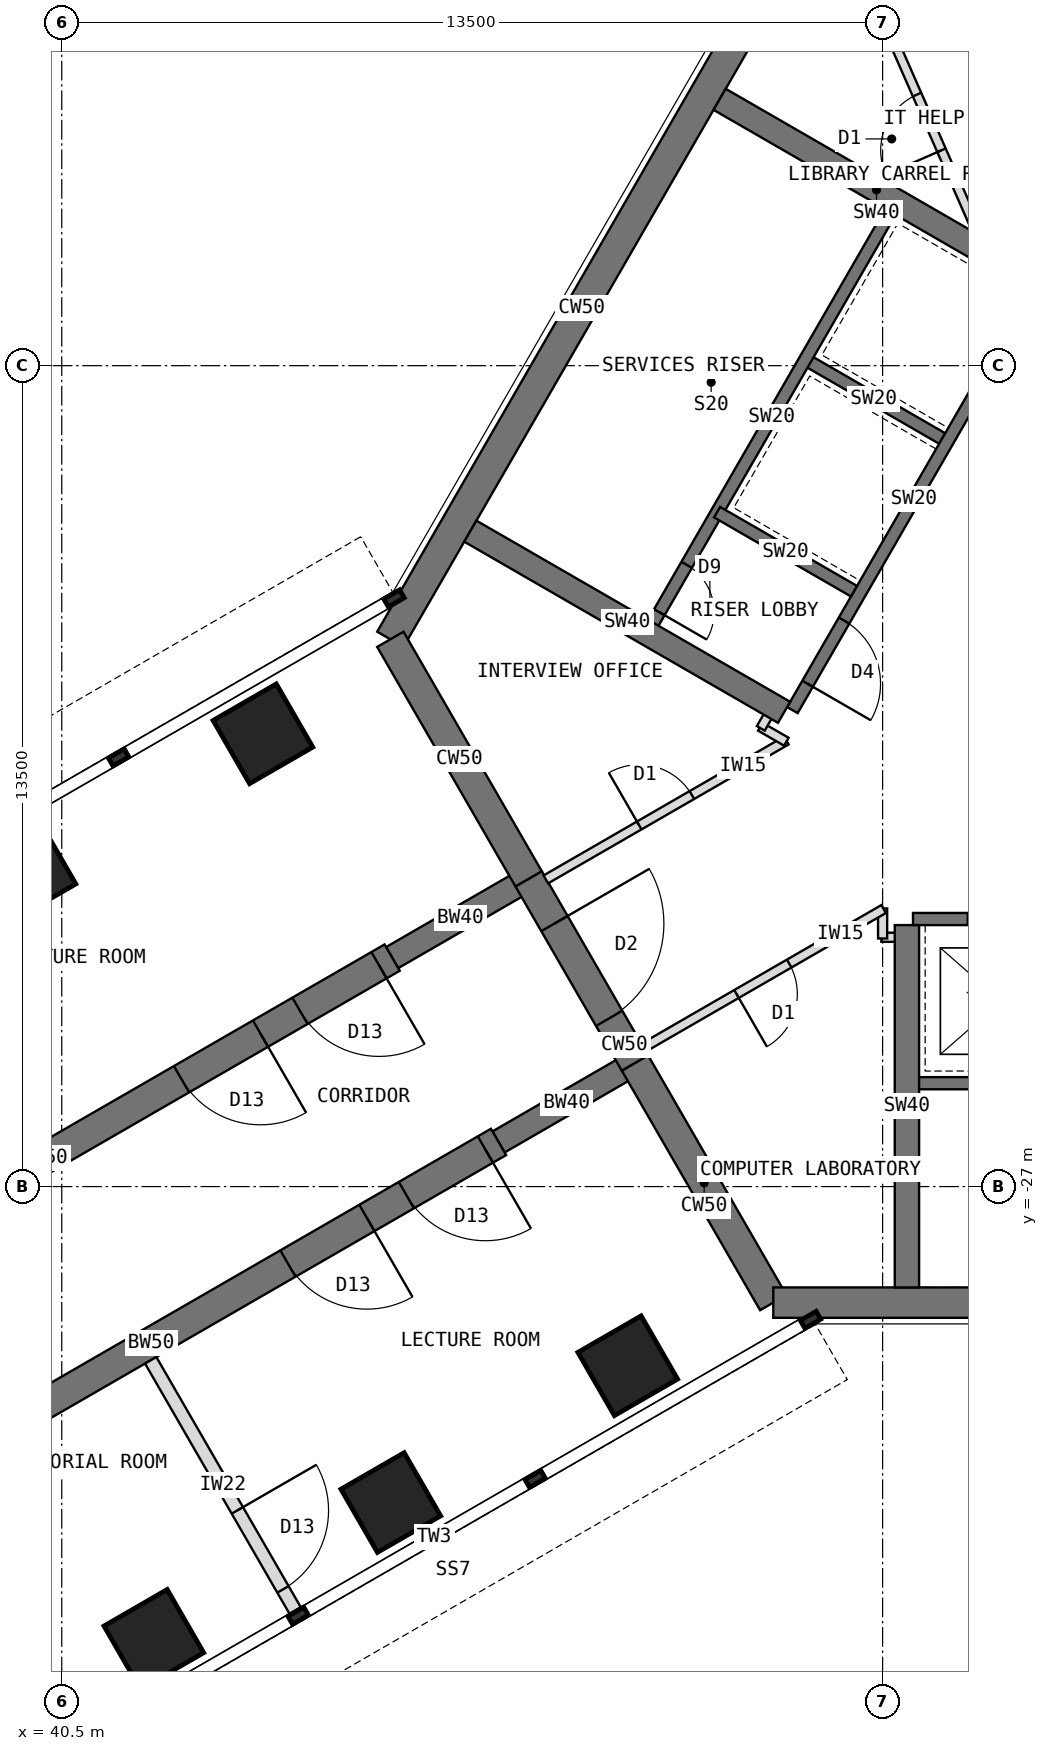
"""IFC4 building model, lengths in metres.
Left out: names, types, materials, properties, quantities, classifications, styles, units other than length and angle.
Written with IfcOpenShell. Run it as: python <this file> out.ifc"""

import sys

from ifc_helpers import new_model, si_unit, direction, frame, frame_2d, origin, origin_2d, place, context, subcontext, project, spatial, rectangle, extrude, element, fill, save


model = new_model("IFC4")
c1 = context("Model", 3, precision=1e-05, world=origin(), true_north=direction((0.0, 1.0)))
c2 = subcontext(c1, "Body", "Model", "MODEL_VIEW")
j1 = project(units=[si_unit("LENGTHUNIT", "METRE"), si_unit("PLANEANGLEUNIT", "RADIAN")], contexts=[c1])
p1 = place(None, origin())
s1 = spatial("IfcSite", under=j1, at=p1, CompositionType="ELEMENT")
p2 = place(p1, origin())
s2 = spatial("IfcBuilding", under=s1, at=p2, CompositionType="ELEMENT")
p3 = place(p2, frame((0.0, 0.0, 174.5)))
s3 = spatial("IfcBuildingStorey", under=s2, at=p3, CompositionType="ELEMENT", Elevation=174.5)
p4 = place(p3, frame((52.202, -7.092, 0.0), z_axis=(0.0, 0.0, 1.0), x_axis=(-0.500005998175, -0.866021940709, 0.0)))
e1 = element("IfcWall", 1, at=p4, inside=s3, PredefinedType="SHEAR", context=c2, shape_type="SweptSolid", body=[
    extrude(rectangle(XDim=12.596, YDim=0.5, at=frame_2d((6.298, 0.0))), origin(), (0.0, 0.0, 1.0), 4.0),
])
p5 = place(p3, frame((45.904, -18.0, 0.0), z_axis=(0.0, 0.0, 1.0), x_axis=(0.500024481964, -0.866011268655, 0.0)))
e2 = element("IfcWall", 2, at=p5, inside=s3, PredefinedType="SHEAR", context=c2, shape_type="SweptSolid", body=[
    extrude(rectangle(XDim=4.548, YDim=0.5, at=frame_2d((2.274, 0.0))), origin(), (0.0, 0.0, 1.0), 4.0),
])
p6 = place(p3, frame((48.178, -21.939, 0.0), z_axis=(0.0, 0.0, 1.0), x_axis=(0.500010275428, -0.866019471182, 0.0)))
e3 = element("IfcWall", 3, at=p6, inside=s3, PredefinedType="SHEAR", context=c2, shape_type="SweptSolid", body=[
    extrude(rectangle(XDim=3.5, YDim=0.5, at=frame_2d((1.75, 0.0))), origin(), (0.0, 0.0, 1.0), 4.0),
])
p7 = place(p6, frame((0.85, 0.0, 0.0)))
e4 = element("IfcOpeningElement", 4, at=p7, cuts=e3, PredefinedType="OPENING", context=c2, shape_type="SweptSolid", body=[
    extrude(rectangle(XDim=1.8, YDim=2.1, at=frame_2d((0.9, 1.05))), frame((0.0, 0.26, 0.0), z_axis=(0.0, -1.0, 0.0), x_axis=(1.0, 0.0, 0.0)), (0.0, 0.0, 1.0), 0.52),
])
p8 = place(p3, frame((49.928, -24.97, 0.0), z_axis=(0.0, 0.0, 1.0), x_axis=(0.499984222037, -0.866034513004, 0.0)))
e5 = element("IfcWall", 5, at=p8, inside=s3, PredefinedType="SHEAR", context=c2, shape_type="SweptSolid", body=[
    extrude(rectangle(XDim=4.548, YDim=0.5, at=frame_2d((2.274, 0.0))), origin(), (0.0, 0.0, 1.0), 4.0),
])
p9 = place(p3, frame((52.202, -28.908, 0.0), z_axis=(0.0, 0.0, 1.0), x_axis=(1.0, 0.0, 0.0)))
e6 = element("IfcWall", 6, at=p9, inside=s3, PredefinedType="SHEAR", context=c2, shape_type="SweptSolid", body=[
    extrude(rectangle(XDim=12.596, YDim=0.5, at=frame_2d((6.298, 0.0))), origin(), (0.0, 0.0, 1.0), 4.0),
])
p10 = place(p3, frame((49.928, -24.97, 0.0), z_axis=(0.0, 0.0, 1.0), x_axis=(-0.866031863473, -0.499988811324, 0.0)))
e7 = element("IfcWall", 7, at=p10, inside=s3, PredefinedType="SHEAR", context=c2, shape_type="SweptSolid", body=[
    extrude(rectangle(XDim=2.592, YDim=0.4, at=frame_2d((1.296, 0.0))), origin(), (0.0, 0.0, 1.0), 4.0),
])
p11 = place(p3, frame((47.684, -26.266, 0.0), z_axis=(0.0, 0.0, 1.0), x_axis=(-0.866027579429, -0.499996231654, 0.0)))
e8 = element("IfcWall", 8, at=p11, inside=s3, PredefinedType="SHEAR", context=c2, shape_type="SweptSolid", body=[
    extrude(rectangle(XDim=13.2, YDim=0.5, at=frame_2d((6.6, 0.0))), origin(), (0.0, 0.0, 1.0), 4.0),
])
p12 = place(p11, frame((0.25, 0.0, 0.0)))
e9 = element("IfcOpeningElement", 9, at=p12, cuts=e8, PredefinedType="OPENING", context=c2, shape_type="SweptSolid", body=[
    extrude(rectangle(XDim=1.5, YDim=2.1, at=frame_2d((0.75, 1.05))), frame((0.0, 0.26, 0.0), z_axis=(0.0, -1.0, 0.0), x_axis=(1.0, 0.0, 0.0)), (0.0, 0.0, 1.0), 0.52),
])
p13 = place(p11, frame((2.5, 0.0, 0.0)))
e10 = element("IfcOpeningElement", 10, at=p13, cuts=e8, PredefinedType="OPENING", context=c2, shape_type="SweptSolid", body=[
    extrude(rectangle(XDim=1.5, YDim=2.1, at=frame_2d((0.75, 1.05))), frame((0.0, 0.26, 0.0), z_axis=(0.0, -1.0, 0.0), x_axis=(1.0, 0.0, 0.0)), (0.0, 0.0, 1.0), 0.52),
])
p14 = place(p3, frame((48.178, -21.939, 0.0), z_axis=(0.0, 0.0, 1.0), x_axis=(-0.866072649678, -0.499918158782, 0.0)))
e11 = element("IfcWall", 11, at=p14, inside=s3, PredefinedType="SHEAR", context=c2, shape_type="SweptSolid", body=[
    extrude(rectangle(XDim=2.592, YDim=0.4, at=frame_2d((1.296, 0.0))), origin(), (0.0, 0.0, 1.0), 4.0),
])
p15 = place(p3, frame((45.934, -23.234, 0.0), z_axis=(0.0, 0.0, 1.0), x_axis=(-0.866019570528, -0.500010103361, 0.0)))
e12 = element("IfcWall", 12, at=p15, inside=s3, PredefinedType="SHEAR", context=c2, shape_type="SweptSolid", body=[
    extrude(rectangle(XDim=13.2, YDim=0.5, at=frame_2d((6.6, 0.0))), origin(), (0.0, 0.0, 1.0), 4.0),
])
p16 = place(p15, frame((0.25, 0.0, 0.0)))
e13 = element("IfcOpeningElement", 13, at=p16, cuts=e12, PredefinedType="OPENING", context=c2, shape_type="SweptSolid", body=[
    extrude(rectangle(XDim=1.5, YDim=2.1, at=frame_2d((0.75, 1.05))), frame((0.0, 0.26, 0.0), z_axis=(0.0, -1.0, 0.0), x_axis=(1.0, 0.0, 0.0)), (0.0, 0.0, 1.0), 0.52),
])
p17 = place(p15, frame((2.5, 0.0, 0.0)))
e14 = element("IfcOpeningElement", 14, at=p17, cuts=e12, PredefinedType="OPENING", context=c2, shape_type="SweptSolid", body=[
    extrude(rectangle(XDim=1.5, YDim=2.1, at=frame_2d((0.75, 1.05))), frame((0.0, 0.26, 0.0), z_axis=(0.0, -1.0, 0.0), x_axis=(1.0, 0.0, 0.0)), (0.0, 0.0, 1.0), 0.52),
])
for number, where, z_axis, x_axis in (
    (15, (49.809, -29.946, 0.0), (0.0, 0.0, 1.0), (0.866, 0.5, 0.0)),
    (16, (43.809, -19.554, 0.0), (0.0, 0.0, 1.0), (0.866, 0.5, 0.0)),
    (17, (45.912, -32.196, 0.0), (0.0, 0.0, 1.0), (0.866, 0.5, 0.0)),
    (18, (39.912, -21.804, 0.0), (0.0, 0.0, 1.0), (0.866, 0.5, 0.0)),
    (19, (42.014, -34.446, 0.0), (0.0, 0.0, 1.0), (0.866, 0.5, 0.0)),
):
    element("IfcColumn", number, at=place(p3, frame(where, z_axis=z_axis, x_axis=x_axis)), inside=s3, PredefinedType="COLUMN", context=c2, shape_type="SweptSolid", body=[
        extrude(rectangle(XDim=1.2, YDim=1.2, at=origin_2d()), origin(), (0.0, 0.0, 1.0), 4.0),
    ])
p18 = place(p3, frame((40.433, -36.456, 0.0), z_axis=(0.0, 0.0, 1.0), x_axis=(-0.500046648681, 0.865998469481, 0.0)))
e20 = element("IfcWall", 20, at=p18, inside=s3, PredefinedType="STANDARD", context=c2, shape_type="SweptSolid", body=[
    extrude(rectangle(XDim=2.325, YDim=0.25, at=frame_2d((1.163, 0.0))), origin(), (0.0, 0.0, 1.0), 3.8),
])
p19 = place(p3, frame((56.516, -12.236, 0.0), z_axis=(0.0, 0.0, 1.0), x_axis=(-0.49999894854, -0.866026010844, 0.0)))
e21 = element("IfcWall", 21, at=p19, inside=s3, PredefinedType="SHEAR", context=c2, shape_type="SweptSolid", body=[
    extrude(rectangle(XDim=8.0, YDim=0.2, at=frame_2d((4.0, 0.0))), origin(), (0.0, 0.0, 1.0), 4.0),
])
p20 = place(p19, frame((6.3, 0.0, 0.0)))
e22 = element("IfcOpeningElement", 22, at=p20, cuts=e21, PredefinedType="OPENING", context=c2, shape_type="SweptSolid", body=[
    extrude(rectangle(XDim=1.2, YDim=2.1, at=frame_2d((0.6, 1.05))), frame((0.0, 0.11, 0.0), z_axis=(0.0, -1.0, 0.0), x_axis=(1.0, 0.0, 0.0)), (0.0, 0.0, 1.0), 0.22),
])
for number, where, z_axis, x_axis in (
    (23, (54.98, -14.697, 0.0), (0.0, 0.0, 1.0), (-0.866, 0.5, 0.0)),
    (24, (53.53, -17.209, 0.0), (0.0, 0.0, 1.0), (-0.866, 0.5, 0.0)),
):
    element("IfcWall", number, at=place(p3, frame(where, z_axis=z_axis, x_axis=x_axis)), inside=s3, PredefinedType="SHEAR", context=c2, shape_type="SweptSolid", body=[
        extrude(rectangle(XDim=2.6, YDim=0.2, at=frame_2d((1.3, 0.0))), origin(), (0.0, 0.0, 1.0), 4.0),
    ])
p21 = place(p3, frame((54.178, -10.886, 0.0), z_axis=(0.0, 0.0, 1.0), x_axis=(-0.49999894854, -0.866026010844, 0.0)))
e25 = element("IfcWall", 25, at=p21, inside=s3, PredefinedType="SHEAR", context=c2, shape_type="SweptSolid", body=[
    extrude(rectangle(XDim=8.0, YDim=0.2, at=frame_2d((4.0, 0.0))), origin(), (0.0, 0.0, 1.0), 4.0),
])
p22 = place(p21, frame((6.8, 0.0, 0.0)))
e26 = element("IfcOpeningElement", 26, at=p22, cuts=e25, PredefinedType="OPENING", context=c2, shape_type="SweptSolid", body=[
    extrude(rectangle(XDim=0.9, YDim=2.1, at=frame_2d((0.45, 1.05))), frame((0.0, 0.11, 0.0), z_axis=(0.0, -1.0, 0.0), x_axis=(1.0, 0.0, 0.0)), (0.0, 0.0, 1.0), 0.22),
])
p23 = place(p3, frame((52.38, -19.201, 0.0), z_axis=(0.0, 0.0, 1.0), x_axis=(-0.866012946976, 0.500021575205, 0.0)))
e27 = element("IfcWall", 27, at=p23, inside=s3, PredefinedType="SHEAR", context=c2, shape_type="SweptSolid", body=[
    extrude(rectangle(XDim=5.958, YDim=0.4, at=frame_2d((2.979, 0.0))), origin(), (0.0, 0.0, 1.0), 4.0),
])
p24 = place(p3, frame((56.48, -12.099, 0.0), z_axis=(0.0, 0.0, 1.0), x_axis=(-0.86602319114, 0.500003832394, 0.0)))
e28 = element("IfcWall", 28, at=p24, inside=s3, PredefinedType="SHEAR", context=c2, shape_type="SweptSolid", body=[
    extrude(rectangle(XDim=5.958, YDim=0.4, at=frame_2d((2.979, 0.0))), origin(), (0.0, 0.0, 1.0), 4.0),
])
p25 = place(p3, frame((54.5, -22.6, 0.0), z_axis=(0.0, 0.0, 1.0), x_axis=(1.0, 0.0, 0.0)))
e29 = element("IfcWall", 29, at=p25, inside=s3, PredefinedType="SHEAR", context=c2, shape_type="SweptSolid", body=[
    extrude(rectangle(XDim=8.0, YDim=0.2, at=frame_2d((4.0, 0.0))), origin(), (0.0, 0.0, 1.0), 4.0),
])
p26 = place(p25, frame((6.3, 0.0, 0.0)))
e30 = element("IfcOpeningElement", 30, at=p26, cuts=e29, PredefinedType="OPENING", context=c2, shape_type="SweptSolid", body=[
    extrude(rectangle(XDim=1.2, YDim=2.1, at=frame_2d((0.6, 1.05))), frame((0.0, 0.11, 0.0), z_axis=(0.0, -1.0, 0.0), x_axis=(1.0, 0.0, 0.0)), (0.0, 0.0, 1.0), 0.22),
])
p27 = place(p25, frame((0.9, 0.0, 0.0)))
e31 = element("IfcOpeningElement", 31, at=p27, cuts=e29, PredefinedType="OPENING", context=c2, shape_type="SweptSolid", body=[
    extrude(rectangle(XDim=1.1, YDim=2.2, at=frame_2d((0.55, 1.1))), frame((0.0, 0.11, 0.0), z_axis=(0.0, -1.0, 0.0), x_axis=(1.0, 0.0, 0.0)), (0.0, 0.0, 1.0), 0.22),
])
p28 = place(p3, frame((54.5, -25.3, 0.0), z_axis=(0.0, 0.0, 1.0), x_axis=(1.0, 0.0, 0.0)))
e32 = element("IfcWall", 32, at=p28, inside=s3, PredefinedType="SHEAR", context=c2, shape_type="SweptSolid", body=[
    extrude(rectangle(XDim=8.0, YDim=0.2, at=frame_2d((4.0, 0.0))), origin(), (0.0, 0.0, 1.0), 4.0),
])
p29 = place(p28, frame((6.7, 0.0, 0.0)))
e33 = element("IfcOpeningElement", 33, at=p29, cuts=e32, PredefinedType="OPENING", context=c2, shape_type="SweptSolid", body=[
    extrude(rectangle(XDim=1.1, YDim=2.1, at=frame_2d((0.55, 1.05))), frame((0.0, 0.11, 0.0), z_axis=(0.0, -1.0, 0.0), x_axis=(1.0, 0.0, 0.0)), (0.0, 0.0, 1.0), 0.22),
])
p30 = place(p3, frame((54.4, -22.7, 0.0), z_axis=(0.0, 0.0, 1.0), x_axis=(0.0, -1.0, 0.0)))
e34 = element("IfcWall", 34, at=p30, inside=s3, PredefinedType="SHEAR", context=c2, shape_type="SweptSolid", body=[
    extrude(rectangle(XDim=5.958, YDim=0.4, at=frame_2d((2.979, 0.0))), origin(), (0.0, 0.0, 1.0), 4.0),
])
p31 = place(p3, frame((41.963, -29.857, 0.0), z_axis=(0.0, 0.0, 1.0), x_axis=(0.499986429846, -0.866033238375, 0.0)))
e35 = element("IfcWall", 35, at=p31, inside=s3, PredefinedType="PARTITIONING", context=c2, shape_type="SweptSolid", body=[
    extrude(rectangle(XDim=4.75, YDim=0.215, at=frame_2d((2.375, 0.0))), origin(), (0.0, 0.0, 1.0), 3.8),
])
p32 = place(p31, frame((2.85, 0.0, 0.0)))
e36 = element("IfcOpeningElement", 36, at=p32, cuts=e35, PredefinedType="OPENING", context=c2, shape_type="SweptSolid", body=[
    extrude(rectangle(XDim=1.5, YDim=2.1, at=frame_2d((0.75, 1.05))), frame((0.0, 0.117, 0.0), z_axis=(0.0, -1.0, 0.0), x_axis=(1.0, 0.0, 0.0)), (0.0, 0.0, 1.0), 0.235),
])
p33 = place(p3, frame((54.41, -22.9, 0.0), z_axis=(0.0, 0.0, 1.0), x_axis=(-1.0, 0.0, 0.0)))
e37 = element("IfcWall", 37, at=p33, inside=s3, PredefinedType="PARTITIONING", context=c2, shape_type="SweptSolid", body=[
    extrude(rectangle(XDim=0.43, YDim=0.15, at=frame_2d((0.215, 0.0))), origin(), (0.0, 0.0, 1.0), 3.8),
])
p34 = place(p3, frame((54.0, -22.92, 0.0), z_axis=(0.0, 0.0, 1.0), x_axis=(0.0, 1.0, 0.0)))
e38 = element("IfcWall", 38, at=p34, inside=s3, PredefinedType="PARTITIONING", context=c2, shape_type="SweptSolid", body=[
    extrude(rectangle(XDim=0.494, YDim=0.15, at=frame_2d((0.247, 0.0))), origin(), (0.0, 0.0, 1.0), 3.8),
])
p35 = place(p3, frame((54.017, -22.436, 0.0), z_axis=(0.0, 0.0, 1.0), x_axis=(-0.866024503882, -0.500001558674, 0.0)))
e39 = element("IfcWall", 39, at=p35, inside=s3, PredefinedType="PARTITIONING", context=c2, shape_type="SweptSolid", body=[
    extrude(rectangle(XDim=4.568, YDim=0.15, at=frame_2d((2.284, 0.0))), origin(), (0.0, 0.0, 1.0), 3.8),
])
p36 = place(p35, frame((1.794, 0.0, 0.0)))
e40 = element("IfcOpeningElement", 40, at=p36, cuts=e39, PredefinedType="OPENING", context=c2, shape_type="SweptSolid", body=[
    extrude(rectangle(XDim=1.0, YDim=2.1, at=frame_2d((0.5, 1.05))), frame((0.0, 0.085, 0.0), z_axis=(0.0, -1.0, 0.0), x_axis=(1.0, 0.0, 0.0)), (0.0, 0.0, 1.0), 0.17),
])
p37 = place(p3, frame((48.461, -21.948, 0.0), z_axis=(0.0, 0.0, 1.0), x_axis=(0.866024503882, 0.500001558674, 0.0)))
e41 = element("IfcWall", 41, at=p37, inside=s3, PredefinedType="PARTITIONING", context=c2, shape_type="SweptSolid", body=[
    extrude(rectangle(XDim=4.568, YDim=0.15, at=frame_2d((2.284, 0.0))), origin(), (0.0, 0.0, 1.0), 3.8),
])
p38 = place(p37, frame((1.774, 0.0, 0.0)))
e42 = element("IfcOpeningElement", 42, at=p38, cuts=e41, PredefinedType="OPENING", context=c2, shape_type="SweptSolid", body=[
    extrude(rectangle(XDim=1.0, YDim=2.1, at=frame_2d((0.5, 1.05))), frame((0.0, 0.085, 0.0), z_axis=(0.0, -1.0, 0.0), x_axis=(1.0, 0.0, 0.0)), (0.0, 0.0, 1.0), 0.17),
])
p39 = place(p3, frame((52.417, -19.684, 0.0), z_axis=(0.0, 0.0, 1.0), x_axis=(-0.865831790172, 0.50033519877, 0.0)))
e43 = element("IfcWall", 43, at=p39, inside=s3, PredefinedType="PARTITIONING", context=c2, shape_type="SweptSolid", body=[
    extrude(rectangle(XDim=0.494, YDim=0.15, at=frame_2d((0.247, 0.0))), origin(), (0.0, 0.0, 1.0), 3.8),
])
p40 = place(p3, frame((51.997, -19.464, 0.0), z_axis=(0.0, 0.0, 1.0), x_axis=(0.499804398801, 0.866138304741, 0.0)))
e44 = element("IfcWall", 44, at=p40, inside=s3, PredefinedType="PARTITIONING", context=c2, shape_type="SweptSolid", body=[
    extrude(rectangle(XDim=0.43, YDim=0.15, at=frame_2d((0.215, 0.0))), origin(), (0.0, 0.0, 1.0), 3.8),
])
p41 = place(p3, frame((55.715, -11.658, 0.0), z_axis=(0.0, 0.0, 1.0), x_axis=(-0.402073730919, 0.915607292951, 0.0)))
e45 = element("IfcWall", 45, at=p41, inside=s3, PredefinedType="PARTITIONING", context=c2, shape_type="SweptSolid", body=[
    extrude(rectangle(XDim=4.714, YDim=0.15, at=frame_2d((2.357, 0.0))), origin(), (0.0, 0.0, 1.0), 3.8),
])
p42 = place(p41, frame((1.857, 0.0, 0.0)))
e46 = element("IfcOpeningElement", 46, at=p42, cuts=e45, PredefinedType="OPENING", context=c2, shape_type="SweptSolid", body=[
    extrude(rectangle(XDim=1.0, YDim=2.1, at=frame_2d((0.5, 1.05))), frame((0.0, 0.085, 0.0), z_axis=(0.0, -1.0, 0.0), x_axis=(1.0, 0.0, 0.0)), (0.0, 0.0, 1.0), 0.17),
])
p43 = place(p20, origin())
e47 = element("IfcDoor", 47, at=p43, inside=s3, OperationType="SINGLE_SWING_RIGHT", PredefinedType="DOOR", context=c2, shape_type="SweptSolid", body=[
    extrude(rectangle(XDim=1.2, YDim=2.1, at=frame_2d((0.6, 1.05))), frame((0.0, 0.025, 0.0), z_axis=(0.0, -1.0, 0.0), x_axis=(1.0, 0.0, 0.0)), (0.0, 0.0, 1.0), 0.05),
])
fill(e22, e47)
p44 = place(p22, origin())
e48 = element("IfcDoor", 48, at=p44, inside=s3, OperationType="SINGLE_SWING_RIGHT", PredefinedType="DOOR", context=c2, shape_type="SweptSolid", body=[
    extrude(rectangle(XDim=0.9, YDim=2.1, at=frame_2d((0.45, 1.05))), frame((0.0, 0.025, 0.0), z_axis=(0.0, -1.0, 0.0), x_axis=(1.0, 0.0, 0.0)), (0.0, 0.0, 1.0), 0.05),
])
fill(e26, e48)
p45 = place(p7, origin())
e49 = element("IfcDoor", 49, at=p45, inside=s3, OperationType="DOUBLE_DOOR_DOUBLE_SWING", PredefinedType="DOOR", context=c2, shape_type="SweptSolid", body=[
    extrude(rectangle(XDim=1.8, YDim=2.1, at=frame_2d((0.9, 1.05))), frame((0.0, 0.025, 0.0), z_axis=(0.0, -1.0, 0.0), x_axis=(1.0, 0.0, 0.0)), (0.0, 0.0, 1.0), 0.05),
])
fill(e4, e49)
p46 = place(p32, origin())
e50 = element("IfcDoor", 50, at=p46, inside=s3, OperationType="DOUBLE_DOOR_SINGLE_SWING", PredefinedType="DOOR", context=c2, shape_type="SweptSolid", body=[
    extrude(rectangle(XDim=1.5, YDim=2.1, at=frame_2d((0.75, 1.05))), frame((0.0, 0.025, 0.0), z_axis=(0.0, -1.0, 0.0), x_axis=(1.0, 0.0, 0.0)), (0.0, 0.0, 1.0), 0.05),
])
fill(e36, e50)
p47 = place(p38, origin())
e51 = element("IfcDoor", 51, at=p47, inside=s3, OperationType="SINGLE_SWING_LEFT", PredefinedType="DOOR", context=c2, shape_type="SweptSolid", body=[
    extrude(rectangle(XDim=1.0, YDim=2.1, at=frame_2d((0.5, 1.05))), frame((0.0, 0.025, 0.0), z_axis=(0.0, -1.0, 0.0), x_axis=(1.0, 0.0, 0.0)), (0.0, 0.0, 1.0), 0.05),
])
fill(e42, e51)
p48 = place(p36, origin())
e52 = element("IfcDoor", 52, at=p48, inside=s3, OperationType="SINGLE_SWING_RIGHT", PredefinedType="DOOR", context=c2, shape_type="SweptSolid", body=[
    extrude(rectangle(XDim=1.0, YDim=2.1, at=frame_2d((0.5, 1.05))), frame((0.0, 0.025, 0.0), z_axis=(0.0, -1.0, 0.0), x_axis=(1.0, 0.0, 0.0)), (0.0, 0.0, 1.0), 0.05),
])
fill(e40, e52)
p49 = place(p42, origin())
e53 = element("IfcDoor", 53, at=p49, inside=s3, OperationType="SINGLE_SWING_LEFT", PredefinedType="DOOR", context=c2, shape_type="SweptSolid", body=[
    extrude(rectangle(XDim=1.0, YDim=2.1, at=frame_2d((0.5, 1.05))), frame((0.0, 0.025, 0.0), z_axis=(0.0, -1.0, 0.0), x_axis=(1.0, 0.0, 0.0)), (0.0, 0.0, 1.0), 0.05),
])
fill(e46, e53)
p50 = place(p12, origin())
e54 = element("IfcDoor", 54, at=p50, inside=s3, OperationType="DOUBLE_DOOR_SINGLE_SWING", PredefinedType="DOOR", context=c2, shape_type="SweptSolid", body=[
    extrude(rectangle(XDim=1.5, YDim=2.1, at=frame_2d((0.75, 1.05))), frame((0.0, 0.025, 0.0), z_axis=(0.0, -1.0, 0.0), x_axis=(1.0, 0.0, 0.0)), (0.0, 0.0, 1.0), 0.05),
])
fill(e9, e54)
p51 = place(p13, origin())
e55 = element("IfcDoor", 55, at=p51, inside=s3, OperationType="DOUBLE_DOOR_SINGLE_SWING", PredefinedType="DOOR", context=c2, shape_type="SweptSolid", body=[
    extrude(rectangle(XDim=1.5, YDim=2.1, at=frame_2d((0.75, 1.05))), frame((0.0, 0.025, 0.0), z_axis=(0.0, -1.0, 0.0), x_axis=(1.0, 0.0, 0.0)), (0.0, 0.0, 1.0), 0.05),
])
fill(e10, e55)
p52 = place(p16, origin())
e56 = element("IfcDoor", 56, at=p52, inside=s3, OperationType="DOUBLE_DOOR_SINGLE_SWING", PredefinedType="DOOR", context=c2, shape_type="SweptSolid", body=[
    extrude(rectangle(XDim=1.5, YDim=2.1, at=frame_2d((0.75, 1.05))), frame((0.0, 0.025, 0.0), z_axis=(0.0, -1.0, 0.0), x_axis=(1.0, 0.0, 0.0)), (0.0, 0.0, 1.0), 0.05),
])
fill(e13, e56)
p53 = place(p17, origin())
e57 = element("IfcDoor", 57, at=p53, inside=s3, OperationType="DOUBLE_DOOR_SINGLE_SWING", PredefinedType="DOOR", context=c2, shape_type="SweptSolid", body=[
    extrude(rectangle(XDim=1.5, YDim=2.1, at=frame_2d((0.75, 1.05))), frame((0.0, 0.025, 0.0), z_axis=(0.0, -1.0, 0.0), x_axis=(1.0, 0.0, 0.0)), (0.0, 0.0, 1.0), 0.05),
])
fill(e14, e57)
save(model, sys.argv[1])
